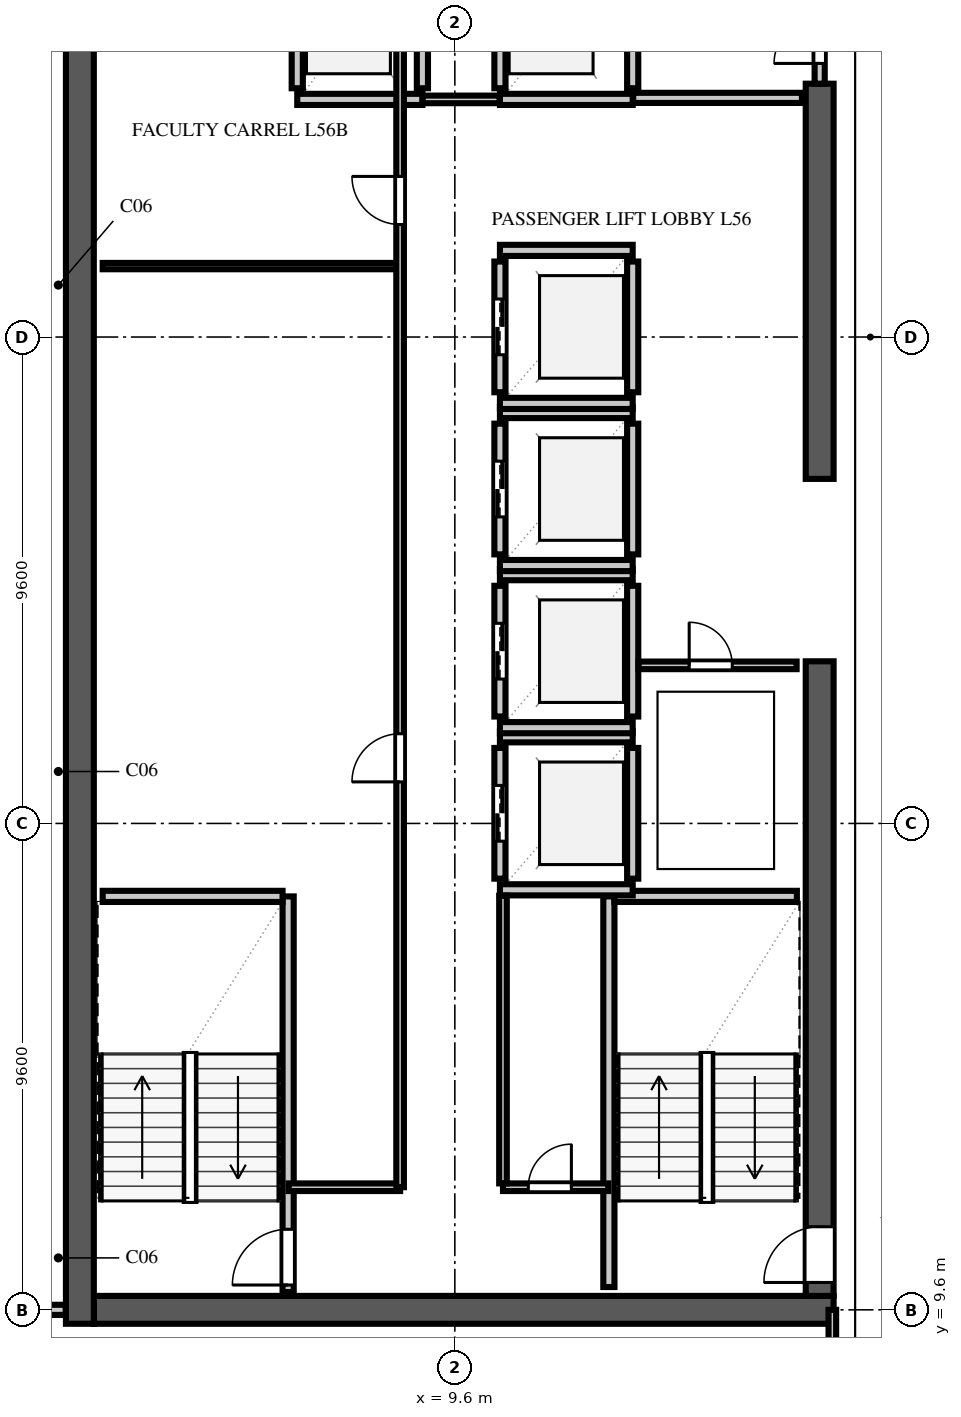
"""IFC4 building model, lengths in metres.
Left out: names, types, materials, properties, quantities, classifications, styles, units other than length and angle.
Written with IfcOpenShell. Run it as: python <this file> out.ifc"""

import sys

from ifc_helpers import new_model, si_unit, direction, frame, frame_2d, origin, place, context, subcontext, project, spatial, rectangle, extrude, element, fill, save


model = new_model("IFC4")
c1 = context("Model", 3, precision=1e-05, world=origin(), true_north=direction((0.0, 1.0)))
c2 = subcontext(c1, "Body", "Model", "MODEL_VIEW")
j1 = project(units=[si_unit("LENGTHUNIT", "METRE"), si_unit("PLANEANGLEUNIT", "RADIAN")], contexts=[c1])
p1 = place(None, origin())
s1 = spatial("IfcSite", under=j1, at=p1, CompositionType="ELEMENT")
p2 = place(p1, origin())
s2 = spatial("IfcBuilding", under=s1, at=p2, CompositionType="ELEMENT")
p3 = place(p2, frame((0.0, 0.0, 221.8)))
s3 = spatial("IfcBuildingStorey", under=s2, at=p3, CompositionType="ELEMENT", Elevation=221.8)
p4 = place(p3, frame((2.475, 9.6, 0.0), z_axis=(0.0, 0.0, 1.0), x_axis=(1.0, 0.0, 0.0)))
e1 = element("IfcWall", 1, at=p4, inside=s3, PredefinedType="SHEAR", context=c2, shape_type="SweptSolid", body=[
    extrude(rectangle(XDim=14.6, YDim=0.55, at=frame_2d((7.3, 0.0))), origin(), (0.0, 0.0, 1.0), 3.54),
])
p5 = place(p3, frame((2.2, 9.325, 0.0), z_axis=(0.0, 0.0, 1.0), x_axis=(0.0, 1.0, 0.0)))
e2 = element("IfcWall", 2, at=p5, inside=s3, PredefinedType="SHEAR", context=c2, shape_type="SweptSolid", body=[
    extrude(rectangle(XDim=38.95, YDim=0.55, at=frame_2d((19.475, 0.0))), origin(), (0.0, 0.0, 1.0), 3.54),
])
p6 = place(p3, frame((16.8, 9.875, 0.0), z_axis=(0.0, 0.0, 1.0), x_axis=(0.0, 1.0, 0.0)))
e3 = element("IfcWall", 3, at=p6, inside=s3, PredefinedType="SHEAR", context=c2, shape_type="SweptSolid", body=[
    extrude(rectangle(XDim=12.525, YDim=0.55, at=frame_2d((6.262, 0.0))), origin(), (0.0, 0.0, 1.0), 3.54),
])
p7 = place(p6, frame((0.265, 0.0, 0.0)))
e4 = element("IfcOpeningElement", 4, at=p7, cuts=e3, PredefinedType="OPENING", context=c2, shape_type="SweptSolid", body=[
    extrude(rectangle(XDim=1.1, YDim=2.2, at=frame_2d((0.55, 1.1))), frame((0.0, 0.287, 0.0), z_axis=(0.0, -1.0, 0.0), x_axis=(1.0, 0.0, 0.0)), (0.0, 0.0, 1.0), 0.574),
])
p8 = place(p3, frame((16.8, 26.0, 0.0), z_axis=(0.0, 0.0, 1.0), x_axis=(0.0, 1.0, 0.0)))
e5 = element("IfcWall", 5, at=p8, inside=s3, PredefinedType="SHEAR", context=c2, shape_type="SweptSolid", body=[
    extrude(rectangle(XDim=7.8, YDim=0.55, at=frame_2d((3.9, 0.0))), origin(), (0.0, 0.0, 1.0), 3.54),
])
p9 = place(p3, frame((6.31, 9.95, 0.0), z_axis=(0.0, 0.0, 1.0), x_axis=(0.0, 1.0, 0.0)))
e6 = element("IfcWall", 6, at=p9, inside=s3, PredefinedType="SOLIDWALL", context=c2, shape_type="SweptSolid", body=[
    extrude(rectangle(XDim=7.81, YDim=0.22, at=frame_2d((3.905, 0.0))), origin(), (0.0, 0.0, 1.0), 3.54),
])
p10 = place(p9, frame((0.14, 0.0, 0.0)))
e7 = element("IfcOpeningElement", 7, at=p10, cuts=e6, PredefinedType="OPENING", context=c2, shape_type="SweptSolid", body=[
    extrude(rectangle(XDim=1.1, YDim=2.2, at=frame_2d((0.55, 1.1))), frame((0.0, 0.122, 0.0), z_axis=(0.0, -1.0, 0.0), x_axis=(1.0, 0.0, 0.0)), (0.0, 0.0, 1.0), 0.244),
])
p11 = place(p3, frame((2.65, 17.76, 0.0), z_axis=(0.0, 0.0, 1.0), x_axis=(1.0, 0.0, 0.0)))
e8 = element("IfcWall", 8, at=p11, inside=s3, PredefinedType="SOLIDWALL", context=c2, shape_type="SweptSolid", body=[
    extrude(rectangle(XDim=3.55, YDim=0.22, at=frame_2d((1.775, 0.0))), origin(), (0.0, 0.0, 1.0), 3.54),
])
p12 = place(p3, frame((12.64, 10.05, 0.0), z_axis=(0.0, 0.0, 1.0), x_axis=(0.0, 1.0, 0.0)))
e9 = element("IfcWall", 9, at=p12, inside=s3, PredefinedType="SOLIDWALL", context=c2, shape_type="SweptSolid", body=[
    extrude(rectangle(XDim=7.71, YDim=0.22, at=frame_2d((3.855, 0.0))), origin(), (0.0, 0.0, 1.0), 3.54),
])
p13 = place(p3, frame((12.75, 17.76, 0.0), z_axis=(0.0, 0.0, 1.0), x_axis=(1.0, 0.0, 0.0)))
e10 = element("IfcWall", 10, at=p13, inside=s3, PredefinedType="SOLIDWALL", context=c2, shape_type="SweptSolid", body=[
    extrude(rectangle(XDim=3.6, YDim=0.22, at=frame_2d((1.8, 0.0))), origin(), (0.0, 0.0, 1.0), 3.54),
])
p14 = place(p3, frame((10.49, 18.11, 0.0), z_axis=(0.0, 0.0, 1.0), x_axis=(0.0, 1.0, 0.0)))
e11 = element("IfcWall", 11, at=p14, inside=s3, PredefinedType="SOLIDWALL", context=c2, shape_type="SweptSolid", body=[
    extrude(rectangle(XDim=2.58, YDim=0.22, at=frame_2d((1.29, 0.0))), origin(), (0.0, 0.0, 1.0), 3.54),
])
p15 = place(p14, frame((0.74, 0.0, 0.0)))
e12 = element("IfcOpeningElement", 12, at=p15, cuts=e11, PredefinedType="OPENING", context=c2, shape_type="SweptSolid", body=[
    extrude(rectangle(XDim=1.1, YDim=2.2, at=frame_2d((0.55, 1.1))), frame((0.0, 0.122, 0.0), z_axis=(0.0, -1.0, 0.0), x_axis=(1.0, 0.0, 0.0)), (0.0, 0.0, 1.0), 0.244),
])
p16 = place(p3, frame((13.11, 18.11, 0.0), z_axis=(0.0, 0.0, 1.0), x_axis=(0.0, 1.0, 0.0)))
e13 = element("IfcWall", 13, at=p16, inside=s3, PredefinedType="SOLIDWALL", context=c2, shape_type="SweptSolid", body=[
    extrude(rectangle(XDim=2.58, YDim=0.22, at=frame_2d((1.29, 0.0))), origin(), (0.0, 0.0, 1.0), 3.54),
])
for number, where, z_axis, x_axis in (
    (14, (10.49, 17.89, 0.0), (0.0, 0.0, 1.0), (1.0, 0.0, 0.0)),
    (15, (10.49, 20.91, 0.0), (0.0, 0.0, 1.0), (1.0, 0.0, 0.0)),
):
    element("IfcWall", number, at=place(p3, frame(where, z_axis=z_axis, x_axis=x_axis)), inside=s3, PredefinedType="SOLIDWALL", context=c2, shape_type="SweptSolid", body=[
        extrude(rectangle(XDim=2.62, YDim=0.22, at=frame_2d((1.31, 0.0))), origin(), (0.0, 0.0, 1.0), 3.54),
    ])
p17 = place(p3, frame((10.49, 21.31, 0.0), z_axis=(0.0, 0.0, 1.0), x_axis=(0.0, 1.0, 0.0)))
e16 = element("IfcWall", 16, at=p17, inside=s3, PredefinedType="SOLIDWALL", context=c2, shape_type="SweptSolid", body=[
    extrude(rectangle(XDim=2.58, YDim=0.22, at=frame_2d((1.29, 0.0))), origin(), (0.0, 0.0, 1.0), 3.54),
])
p18 = place(p17, frame((0.74, 0.0, 0.0)))
e17 = element("IfcOpeningElement", 17, at=p18, cuts=e16, PredefinedType="OPENING", context=c2, shape_type="SweptSolid", body=[
    extrude(rectangle(XDim=1.1, YDim=2.2, at=frame_2d((0.55, 1.1))), frame((0.0, 0.122, 0.0), z_axis=(0.0, -1.0, 0.0), x_axis=(1.0, 0.0, 0.0)), (0.0, 0.0, 1.0), 0.244),
])
p19 = place(p3, frame((13.11, 21.31, 0.0), z_axis=(0.0, 0.0, 1.0), x_axis=(0.0, 1.0, 0.0)))
e18 = element("IfcWall", 18, at=p19, inside=s3, PredefinedType="SOLIDWALL", context=c2, shape_type="SweptSolid", body=[
    extrude(rectangle(XDim=2.58, YDim=0.22, at=frame_2d((1.29, 0.0))), origin(), (0.0, 0.0, 1.0), 3.54),
])
for number, where, z_axis, x_axis in (
    (19, (10.49, 21.09, 0.0), (0.0, 0.0, 1.0), (1.0, 0.0, 0.0)),
    (20, (10.49, 24.11, 0.0), (0.0, 0.0, 1.0), (1.0, 0.0, 0.0)),
):
    element("IfcWall", number, at=place(p3, frame(where, z_axis=z_axis, x_axis=x_axis)), inside=s3, PredefinedType="SOLIDWALL", context=c2, shape_type="SweptSolid", body=[
        extrude(rectangle(XDim=2.62, YDim=0.22, at=frame_2d((1.31, 0.0))), origin(), (0.0, 0.0, 1.0), 3.54),
    ])
p20 = place(p3, frame((10.49, 24.51, 0.0), z_axis=(0.0, 0.0, 1.0), x_axis=(0.0, 1.0, 0.0)))
e21 = element("IfcWall", 21, at=p20, inside=s3, PredefinedType="SOLIDWALL", context=c2, shape_type="SweptSolid", body=[
    extrude(rectangle(XDim=2.58, YDim=0.22, at=frame_2d((1.29, 0.0))), origin(), (0.0, 0.0, 1.0), 3.54),
])
p21 = place(p20, frame((0.74, 0.0, 0.0)))
e22 = element("IfcOpeningElement", 22, at=p21, cuts=e21, PredefinedType="OPENING", context=c2, shape_type="SweptSolid", body=[
    extrude(rectangle(XDim=1.1, YDim=2.2, at=frame_2d((0.55, 1.1))), frame((0.0, 0.122, 0.0), z_axis=(0.0, -1.0, 0.0), x_axis=(1.0, 0.0, 0.0)), (0.0, 0.0, 1.0), 0.244),
])
p22 = place(p3, frame((13.11, 24.51, 0.0), z_axis=(0.0, 0.0, 1.0), x_axis=(0.0, 1.0, 0.0)))
e23 = element("IfcWall", 23, at=p22, inside=s3, PredefinedType="SOLIDWALL", context=c2, shape_type="SweptSolid", body=[
    extrude(rectangle(XDim=2.58, YDim=0.22, at=frame_2d((1.29, 0.0))), origin(), (0.0, 0.0, 1.0), 3.54),
])
for number, where, z_axis, x_axis in (
    (24, (10.49, 24.29, 0.0), (0.0, 0.0, 1.0), (1.0, 0.0, 0.0)),
    (25, (10.49, 27.31, 0.0), (0.0, 0.0, 1.0), (1.0, 0.0, 0.0)),
):
    element("IfcWall", number, at=place(p3, frame(where, z_axis=z_axis, x_axis=x_axis)), inside=s3, PredefinedType="SOLIDWALL", context=c2, shape_type="SweptSolid", body=[
        extrude(rectangle(XDim=2.62, YDim=0.22, at=frame_2d((1.31, 0.0))), origin(), (0.0, 0.0, 1.0), 3.54),
    ])
p23 = place(p3, frame((10.49, 27.71, 0.0), z_axis=(0.0, 0.0, 1.0), x_axis=(0.0, 1.0, 0.0)))
e26 = element("IfcWall", 26, at=p23, inside=s3, PredefinedType="SOLIDWALL", context=c2, shape_type="SweptSolid", body=[
    extrude(rectangle(XDim=2.58, YDim=0.22, at=frame_2d((1.29, 0.0))), origin(), (0.0, 0.0, 1.0), 3.54),
])
p24 = place(p23, frame((0.74, 0.0, 0.0)))
e27 = element("IfcOpeningElement", 27, at=p24, cuts=e26, PredefinedType="OPENING", context=c2, shape_type="SweptSolid", body=[
    extrude(rectangle(XDim=1.1, YDim=2.2, at=frame_2d((0.55, 1.1))), frame((0.0, 0.122, 0.0), z_axis=(0.0, -1.0, 0.0), x_axis=(1.0, 0.0, 0.0)), (0.0, 0.0, 1.0), 0.244),
])
p25 = place(p3, frame((13.11, 27.71, 0.0), z_axis=(0.0, 0.0, 1.0), x_axis=(0.0, 1.0, 0.0)))
e28 = element("IfcWall", 28, at=p25, inside=s3, PredefinedType="SOLIDWALL", context=c2, shape_type="SweptSolid", body=[
    extrude(rectangle(XDim=2.58, YDim=0.22, at=frame_2d((1.29, 0.0))), origin(), (0.0, 0.0, 1.0), 3.54),
])
for number, where, z_axis, x_axis in (
    (29, (10.49, 27.49, 0.0), (0.0, 0.0, 1.0), (1.0, 0.0, 0.0)),
    (30, (10.49, 30.51, 0.0), (0.0, 0.0, 1.0), (1.0, 0.0, 0.0)),
):
    element("IfcWall", number, at=place(p3, frame(where, z_axis=z_axis, x_axis=x_axis)), inside=s3, PredefinedType="SOLIDWALL", context=c2, shape_type="SweptSolid", body=[
        extrude(rectangle(XDim=2.62, YDim=0.22, at=frame_2d((1.31, 0.0))), origin(), (0.0, 0.0, 1.0), 3.54),
    ])
for number, where, z_axis, x_axis in (
    (31, (6.49, 33.71, 0.0), (0.0, 0.0, 1.0), (0.0, 1.0, 0.0)),
    (32, (8.96, 33.71, 0.0), (0.0, 0.0, 1.0), (0.0, 1.0, 0.0)),
):
    element("IfcWall", number, at=place(p3, frame(where, z_axis=z_axis, x_axis=x_axis)), inside=s3, PredefinedType="SOLIDWALL", context=c2, shape_type="SweptSolid", body=[
        extrude(rectangle(XDim=2.78, YDim=0.22, at=frame_2d((1.39, 0.0))), origin(), (0.0, 0.0, 1.0), 3.54),
    ])
p26 = place(p3, frame((6.49, 33.49, 0.0), z_axis=(0.0, 0.0, 1.0), x_axis=(1.0, 0.0, 0.0)))
e33 = element("IfcWall", 33, at=p26, inside=s3, PredefinedType="SOLIDWALL", context=c2, shape_type="SweptSolid", body=[
    extrude(rectangle(XDim=2.47, YDim=0.22, at=frame_2d((1.235, 0.0))), origin(), (0.0, 0.0, 1.0), 3.54),
])
for number, where, z_axis, x_axis in (
    (34, (10.49, 33.71, 0.0), (0.0, 0.0, 1.0), (0.0, 1.0, 0.0)),
    (35, (13.11, 33.71, 0.0), (0.0, 0.0, 1.0), (0.0, 1.0, 0.0)),
):
    element("IfcWall", number, at=place(p3, frame(where, z_axis=z_axis, x_axis=x_axis)), inside=s3, PredefinedType="SOLIDWALL", context=c2, shape_type="SweptSolid", body=[
        extrude(rectangle(XDim=2.78, YDim=0.22, at=frame_2d((1.39, 0.0))), origin(), (0.0, 0.0, 1.0), 3.54),
    ])
p27 = place(p3, frame((10.49, 33.49, 0.0), z_axis=(0.0, 0.0, 1.0), x_axis=(1.0, 0.0, 0.0)))
e36 = element("IfcWall", 36, at=p27, inside=s3, PredefinedType="SOLIDWALL", context=c2, shape_type="SweptSolid", body=[
    extrude(rectangle(XDim=2.62, YDim=0.22, at=frame_2d((1.31, 0.0))), origin(), (0.0, 0.0, 1.0), 3.54),
])
p28 = place(p3, frame((13.12, 33.52, 0.0), z_axis=(0.0, 0.0, 1.0), x_axis=(1.0, 0.0, 0.0)))
e37 = element("IfcWall", 37, at=p28, inside=s3, PredefinedType="SOLIDWALL", context=c2, shape_type="SweptSolid", body=[
    extrude(rectangle(XDim=3.33, YDim=0.2, at=frame_2d((1.665, 0.0))), origin(), (0.0, 0.0, 1.0), 3.54),
])
p29 = place(p3, frame((16.8, 33.8, 0.0), z_axis=(0.0, 0.0, 1.0), x_axis=(0.0, 1.0, 0.0)))
e38 = element("IfcWall", 38, at=p29, inside=s3, PredefinedType="SOLIDWALL", context=c2, shape_type="SweptSolid", body=[
    extrude(rectangle(XDim=2.6, YDim=0.2, at=frame_2d((1.3, 0.0))), origin(), (0.0, 0.0, 1.0), 3.54),
])
p30 = place(p29, frame((0.4, 0.0, 0.0)))
e39 = element("IfcOpeningElement", 39, at=p30, cuts=e38, PredefinedType="OPENING", context=c2, shape_type="SweptSolid", body=[
    extrude(rectangle(XDim=1.8, YDim=2.2, at=frame_2d((0.9, 1.1))), frame((0.0, 0.112, 0.0), z_axis=(0.0, -1.0, 0.0), x_axis=(1.0, 0.0, 0.0)), (0.0, 0.0, 1.0), 0.224),
])
p31 = place(p3, frame((8.965, 33.49, 0.0), z_axis=(0.0, 0.0, 1.0), x_axis=(1.0, 0.0, 0.0)))
e40 = element("IfcWall", 40, at=p31, inside=s3, PredefinedType="PARTITIONING", context=c2, shape_type="SweptSolid", body=[
    extrude(rectangle(XDim=1.52, YDim=0.15, at=frame_2d((0.76, 0.0))), origin(), (0.0, 0.0, 1.0), 3.54),
])
p32 = place(p3, frame((10.55, 12.02, 0.0), z_axis=(0.0, 0.0, 1.0), x_axis=(1.0, 0.0, 0.0)))
e41 = element("IfcWall", 41, at=p32, inside=s3, PredefinedType="PARTITIONING", context=c2, shape_type="SweptSolid", body=[
    extrude(rectangle(XDim=2.08, YDim=0.15, at=frame_2d((1.04, 0.0))), origin(), (0.0, 0.0, 1.0), 3.54),
])
p33 = place(p32, frame((0.5, 0.0, 0.0)))
e42 = element("IfcOpeningElement", 42, at=p33, cuts=e41, PredefinedType="OPENING", context=c2, shape_type="SweptSolid", body=[
    extrude(rectangle(XDim=0.85, YDim=2.1, at=frame_2d((0.425, 1.05))), frame((0.0, 0.087, 0.0), z_axis=(0.0, -1.0, 0.0), x_axis=(1.0, 0.0, 0.0)), (0.0, 0.0, 1.0), 0.174),
])
p34 = place(p3, frame((10.55, 12.095, 0.0), z_axis=(0.0, 0.0, 1.0), x_axis=(0.0, 1.0, 0.0)))
e43 = element("IfcWall", 43, at=p34, inside=s3, PredefinedType="PARTITIONING", context=c2, shape_type="SweptSolid", body=[
    extrude(rectangle(XDim=5.68, YDim=0.15, at=frame_2d((2.84, 0.0))), origin(), (0.0, 0.0, 1.0), 3.54),
])
p35 = place(p3, frame((13.225, 22.32, 0.0), z_axis=(0.0, 0.0, 1.0), x_axis=(1.0, 0.0, 0.0)))
e44 = element("IfcWall", 44, at=p35, inside=s3, PredefinedType="PARTITIONING", context=c2, shape_type="SweptSolid", body=[
    extrude(rectangle(XDim=3.12, YDim=0.15, at=frame_2d((1.56, 0.0))), origin(), (0.0, 0.0, 1.0), 3.54),
])
p36 = place(p35, frame((1.0, 0.0, 0.0)))
e45 = element("IfcOpeningElement", 45, at=p36, cuts=e44, PredefinedType="OPENING", context=c2, shape_type="SweptSolid", body=[
    extrude(rectangle(XDim=0.85, YDim=2.1, at=frame_2d((0.425, 1.05))), frame((0.0, 0.087, 0.0), z_axis=(0.0, -1.0, 0.0), x_axis=(1.0, 0.0, 0.0)), (0.0, 0.0, 1.0), 0.174),
])
p37 = place(p3, frame((6.32, 12.02, 0.0), z_axis=(0.0, 0.0, 1.0), x_axis=(1.0, 0.0, 0.0)))
e46 = element("IfcWall", 46, at=p37, inside=s3, PredefinedType="PARTITIONING", context=c2, shape_type="SweptSolid", body=[
    extrude(rectangle(XDim=2.2, YDim=0.15, at=frame_2d((1.1, 0.0))), origin(), (0.0, 0.0, 1.0), 3.54),
])
p38 = place(p3, frame((2.65, 30.2, 0.0), z_axis=(0.0, 0.0, 1.0), x_axis=(1.0, 0.0, 0.0)))
e47 = element("IfcWall", 47, at=p38, inside=s3, PredefinedType="PARTITIONING", context=c2, shape_type="SweptSolid", body=[
    extrude(rectangle(XDim=5.87, YDim=0.125, at=frame_2d((2.935, 0.0))), origin(), (0.0, 0.0, 1.0), 3.54),
])
p39 = place(p3, frame((8.52, 12.02, 0.0), z_axis=(0.0, 0.0, 1.0), x_axis=(0.0, 1.0, 0.0)))
e48 = element("IfcWall", 48, at=p39, inside=s3, PredefinedType="PARTITIONING", context=c2, shape_type="SweptSolid", body=[
    extrude(rectangle(XDim=24.76, YDim=0.15, at=frame_2d((12.38, 0.0))), origin(), (0.0, 0.0, 1.0), 3.54),
])
p40 = place(p39, frame((8.0, 0.0, 0.0)))
e49 = element("IfcOpeningElement", 49, at=p40, cuts=e48, PredefinedType="OPENING", context=c2, shape_type="SweptSolid", body=[
    extrude(rectangle(XDim=0.95, YDim=2.15, at=frame_2d((0.475, 1.075))), frame((0.0, 0.087, 0.0), z_axis=(0.0, -1.0, 0.0), x_axis=(1.0, 0.0, 0.0)), (0.0, 0.0, 1.0), 0.174),
])
p41 = place(p39, frame((19.0, 0.0, 0.0)))
e50 = element("IfcOpeningElement", 50, at=p41, cuts=e48, PredefinedType="OPENING", context=c2, shape_type="SweptSolid", body=[
    extrude(rectangle(XDim=0.95, YDim=2.15, at=frame_2d((0.475, 1.075))), frame((0.0, 0.087, 0.0), z_axis=(0.0, -1.0, 0.0), x_axis=(1.0, 0.0, 0.0)), (0.0, 0.0, 1.0), 0.174),
])
p42 = place(p3, frame((0.85, 9.6, 0.0), z_axis=(0.0, 0.0, 1.0), x_axis=(1.0, 0.0, 0.0)))
e51 = element("IfcWall", 51, at=p42, inside=s3, PredefinedType="SOLIDWALL", context=c2, shape_type="SweptSolid", body=[
    extrude(rectangle(XDim=1.07, YDim=0.2, at=frame_2d((0.535, 0.0))), origin(), (0.0, 0.0, 1.0), 2.845),
])
p43 = place(p3, frame((17.05, 0.22, 0.0), z_axis=(0.0, 0.0, 1.0), x_axis=(0.0, 1.0, 0.0)))
e52 = element("IfcWall", 52, at=p43, inside=s3, PredefinedType="PARTITIONING", context=c2, shape_type="SweptSolid", body=[
    extrude(rectangle(XDim=9.38, YDim=0.15, at=frame_2d((4.69, 0.0))), origin(), (0.0, 0.0, 1.0), 3.54),
])
p44 = place(p43, frame((5.58, 0.0, 0.0)))
e53 = element("IfcOpeningElement", 53, at=p44, cuts=e52, PredefinedType="OPENING", context=c2, shape_type="SweptSolid", body=[
    extrude(rectangle(XDim=1.2, YDim=2.2, at=frame_2d((0.6, 1.1))), frame((0.0, 0.087, 0.0), z_axis=(0.0, -1.0, 0.0), x_axis=(1.0, 0.0, 0.0)), (0.0, 0.0, 1.0), 0.174),
])
p45 = place(p10, origin())
e54 = element("IfcDoor", 54, at=p45, inside=s3, OperationType="SINGLE_SWING_LEFT", PredefinedType="DOOR", context=c2, shape_type="SweptSolid", body=[
    extrude(rectangle(XDim=1.1, YDim=2.2, at=frame_2d((0.55, 1.1))), frame((0.0, 0.025, 0.0), z_axis=(0.0, -1.0, 0.0), x_axis=(1.0, 0.0, 0.0)), (0.0, 0.0, 1.0), 0.05),
])
fill(e7, e54)
p46 = place(p7, origin())
e55 = element("IfcDoor", 55, at=p46, inside=s3, OperationType="SINGLE_SWING_LEFT", PredefinedType="DOOR", context=c2, shape_type="SweptSolid", body=[
    extrude(rectangle(XDim=1.1, YDim=2.2, at=frame_2d((0.55, 1.1))), frame((0.0, 0.025, 0.0), z_axis=(0.0, -1.0, 0.0), x_axis=(1.0, 0.0, 0.0)), (0.0, 0.0, 1.0), 0.05),
])
fill(e4, e55)
p47 = place(p15, origin())
e56 = element("IfcDoor", 56, at=p47, inside=s3, OperationType="DOUBLE_DOOR_SLIDING", PredefinedType="DOOR", context=c2, shape_type="SweptSolid", body=[
    extrude(rectangle(XDim=1.1, YDim=2.2, at=frame_2d((0.55, 1.1))), frame((0.0, 0.025, 0.0), z_axis=(0.0, -1.0, 0.0), x_axis=(1.0, 0.0, 0.0)), (0.0, 0.0, 1.0), 0.05),
])
fill(e12, e56)
p48 = place(p18, origin())
e57 = element("IfcDoor", 57, at=p48, inside=s3, OperationType="DOUBLE_DOOR_SLIDING", PredefinedType="DOOR", context=c2, shape_type="SweptSolid", body=[
    extrude(rectangle(XDim=1.1, YDim=2.2, at=frame_2d((0.55, 1.1))), frame((0.0, 0.025, 0.0), z_axis=(0.0, -1.0, 0.0), x_axis=(1.0, 0.0, 0.0)), (0.0, 0.0, 1.0), 0.05),
])
fill(e17, e57)
p49 = place(p21, origin())
e58 = element("IfcDoor", 58, at=p49, inside=s3, OperationType="DOUBLE_DOOR_SLIDING", PredefinedType="DOOR", context=c2, shape_type="SweptSolid", body=[
    extrude(rectangle(XDim=1.1, YDim=2.2, at=frame_2d((0.55, 1.1))), frame((0.0, 0.025, 0.0), z_axis=(0.0, -1.0, 0.0), x_axis=(1.0, 0.0, 0.0)), (0.0, 0.0, 1.0), 0.05),
])
fill(e22, e58)
p50 = place(p24, origin())
e59 = element("IfcDoor", 59, at=p50, inside=s3, OperationType="DOUBLE_DOOR_SLIDING", PredefinedType="DOOR", context=c2, shape_type="SweptSolid", body=[
    extrude(rectangle(XDim=1.1, YDim=2.2, at=frame_2d((0.55, 1.1))), frame((0.0, 0.025, 0.0), z_axis=(0.0, -1.0, 0.0), x_axis=(1.0, 0.0, 0.0)), (0.0, 0.0, 1.0), 0.05),
])
fill(e27, e59)
p51 = place(p30, origin())
e60 = element("IfcDoor", 60, at=p51, inside=s3, OperationType="DOUBLE_DOOR_SINGLE_SWING", PredefinedType="DOOR", context=c2, shape_type="SweptSolid", body=[
    extrude(rectangle(XDim=1.8, YDim=2.2, at=frame_2d((0.9, 1.1))), frame((0.0, 0.025, 0.0), z_axis=(0.0, -1.0, 0.0), x_axis=(1.0, 0.0, 0.0)), (0.0, 0.0, 1.0), 0.05),
])
fill(e39, e60)
p52 = place(p33, origin())
e61 = element("IfcDoor", 61, at=p52, inside=s3, OperationType="SINGLE_SWING_RIGHT", PredefinedType="DOOR", context=c2, shape_type="SweptSolid", body=[
    extrude(rectangle(XDim=0.85, YDim=2.1, at=frame_2d((0.425, 1.05))), frame((0.0, 0.025, 0.0), z_axis=(0.0, -1.0, 0.0), x_axis=(1.0, 0.0, 0.0)), (0.0, 0.0, 1.0), 0.05),
])
fill(e42, e61)
p53 = place(p36, origin())
e62 = element("IfcDoor", 62, at=p53, inside=s3, OperationType="SINGLE_SWING_LEFT", PredefinedType="DOOR", context=c2, shape_type="SweptSolid", body=[
    extrude(rectangle(XDim=0.85, YDim=2.1, at=frame_2d((0.425, 1.05))), frame((0.0, 0.025, 0.0), z_axis=(0.0, -1.0, 0.0), x_axis=(1.0, 0.0, 0.0)), (0.0, 0.0, 1.0), 0.05),
])
fill(e45, e62)
p54 = place(p40, origin())
e63 = element("IfcDoor", 63, at=p54, inside=s3, OperationType="SINGLE_SWING_LEFT", PredefinedType="DOOR", context=c2, shape_type="SweptSolid", body=[
    extrude(rectangle(XDim=0.95, YDim=2.15, at=frame_2d((0.475, 1.075))), frame((0.0, 0.025, 0.0), z_axis=(0.0, -1.0, 0.0), x_axis=(1.0, 0.0, 0.0)), (0.0, 0.0, 1.0), 0.05),
])
fill(e49, e63)
p55 = place(p41, origin())
e64 = element("IfcDoor", 64, at=p55, inside=s3, OperationType="SINGLE_SWING_RIGHT", PredefinedType="DOOR", context=c2, shape_type="SweptSolid", body=[
    extrude(rectangle(XDim=0.95, YDim=2.15, at=frame_2d((0.475, 1.075))), frame((0.0, 0.025, 0.0), z_axis=(0.0, -1.0, 0.0), x_axis=(1.0, 0.0, 0.0)), (0.0, 0.0, 1.0), 0.05),
])
fill(e50, e64)
save(model, sys.argv[1])
